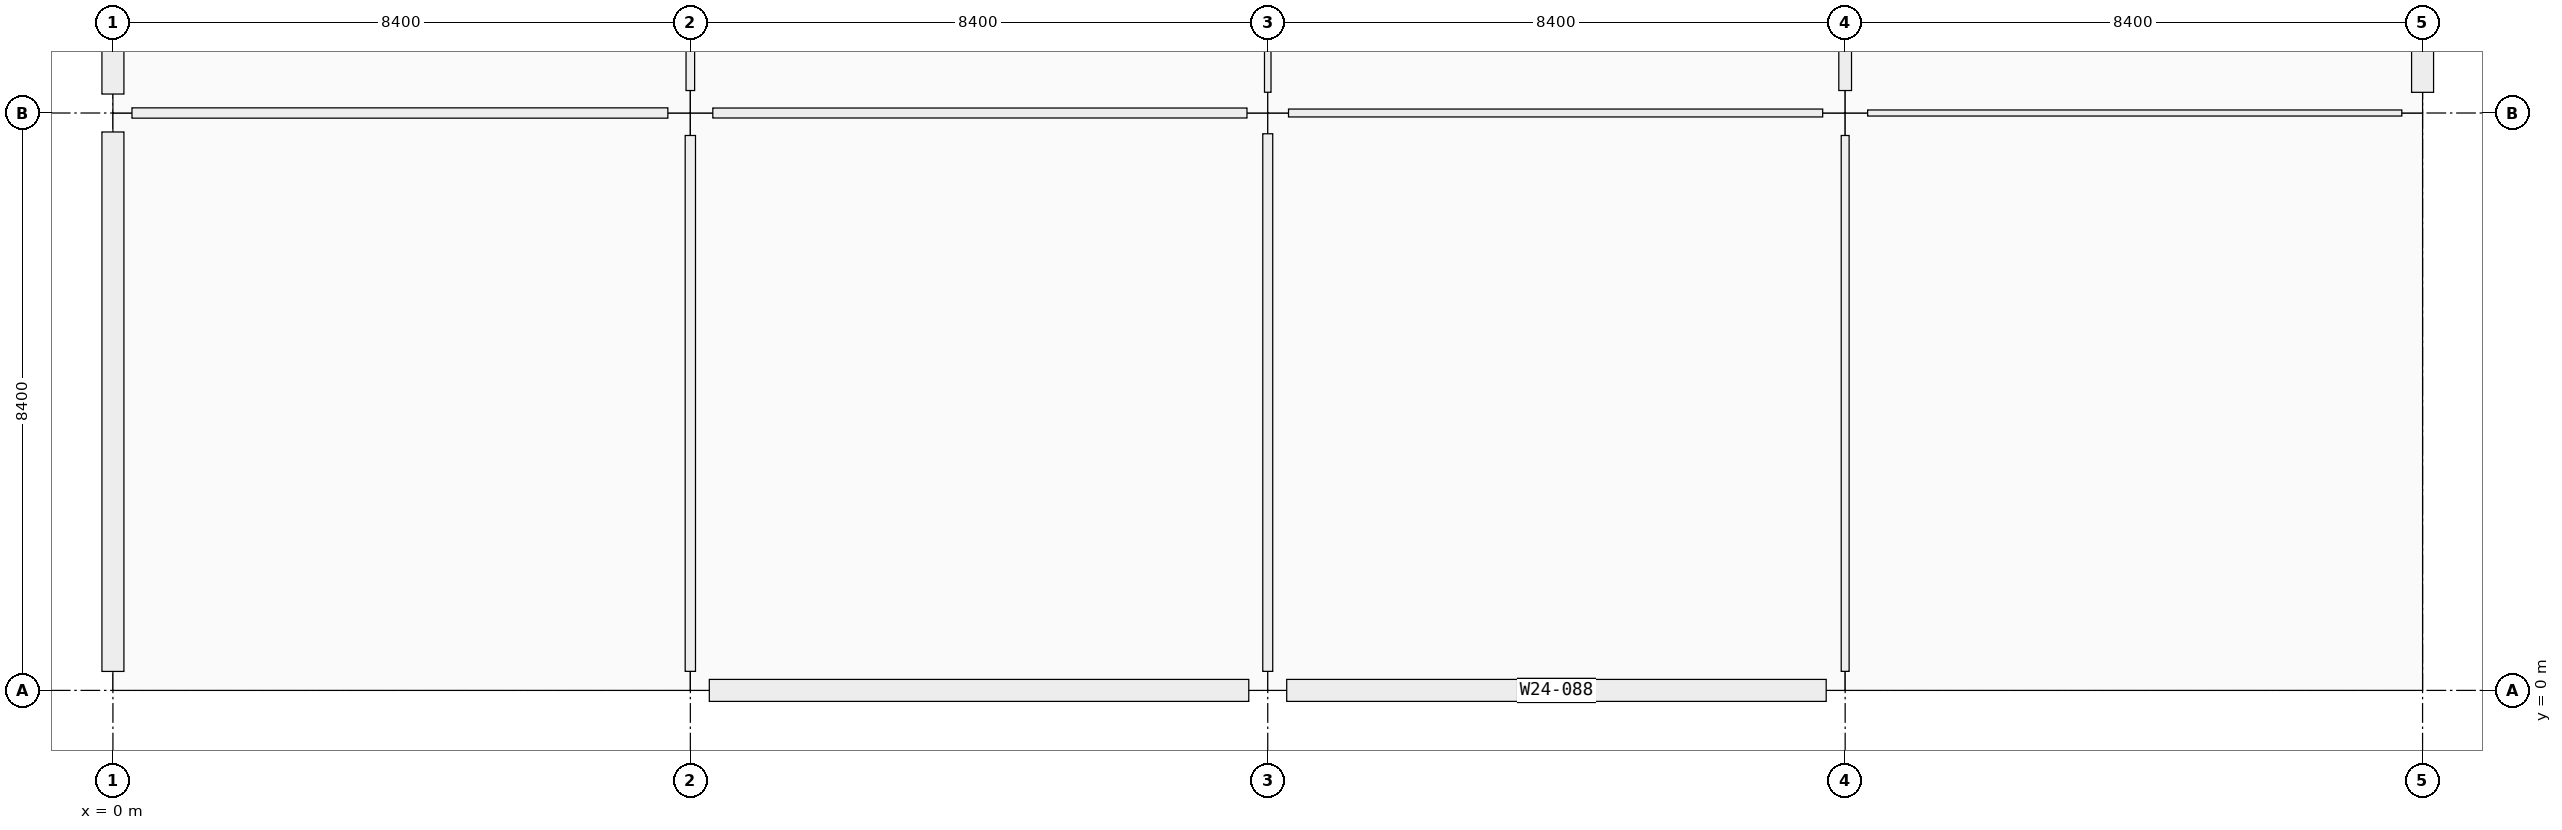
"""IFC4 building model, lengths in metres.
Left out: names, types, materials, properties, quantities, classifications, styles, units other than length and angle.
Written with IfcOpenShell. Run it as: python <this file> out.ifc"""

import sys

from ifc_helpers import new_model, si_unit, direction, frame, frame_2d, origin, origin_2d, place, context, subcontext, project, spatial, rectangle, extrude, element, fill, save


model = new_model("IFC4")
c1 = context("Model", 3, precision=1e-05, world=origin(), true_north=direction((0.0, 1.0)))
c2 = subcontext(c1, "Body", "Model", "MODEL_VIEW")
j1 = project(units=[si_unit("LENGTHUNIT", "METRE"), si_unit("PLANEANGLEUNIT", "RADIAN")], contexts=[c1])
p1 = place(None, origin())
s1 = spatial("IfcSite", under=j1, at=p1, CompositionType="ELEMENT")
p2 = place(p1, origin())
s2 = spatial("IfcBuilding", under=s1, at=p2, CompositionType="ELEMENT")
p3 = place(p2, frame((0.0, 0.0, 5.76)))
s3 = spatial("IfcBuildingStorey", under=s2, at=p3, CompositionType="ELEMENT", Elevation=5.76)
for number, where, z_axis, x_axis in (
    (1, (0.0, 0.0, 0.0), (0.0, 0.0, 1.0), (1.0, 0.0, 0.0)),
    (2, (0.0, 8.4, 0.0), (0.0, 0.0, 1.0), (1.0, 0.0, 0.0)),
    (3, (8.4, 0.0, 0.0), (0.0, 0.0, 1.0), (1.0, 0.0, 0.0)),
):
    element("IfcColumn", number, at=place(p3, frame(where, z_axis=z_axis, x_axis=x_axis)), inside=s3, PredefinedType="COLUMN", context=c2, shape_type="SweptSolid", body=[
        extrude(rectangle(XDim=0.55, YDim=0.55, at=origin_2d()), origin(), (0.0, 0.0, 1.0), 4.2),
    ])
p4 = place(p3, frame((8.4, 8.4, 0.0), z_axis=(0.0, 0.0, 1.0), x_axis=(1.0, 0.0, 0.0)))
e4 = element("IfcColumn", 4, at=p4, inside=s3, PredefinedType="COLUMN", context=c2, shape_type="SweptSolid", body=[
    extrude(rectangle(XDim=0.65, YDim=0.65, at=origin_2d()), origin(), (0.0, 0.0, 1.0), 4.5),
])
p5 = place(p3, frame((16.8, 0.0, 0.0), z_axis=(0.0, 0.0, 1.0), x_axis=(1.0, 0.0, 0.0)))
e5 = element("IfcColumn", 5, at=p5, inside=s3, PredefinedType="COLUMN", context=c2, shape_type="SweptSolid", body=[
    extrude(rectangle(XDim=0.55, YDim=0.55, at=origin_2d()), origin(), (0.0, 0.0, 1.0), 4.2),
])
p6 = place(p3, frame((16.8, 8.4, 0.0), z_axis=(0.0, 0.0, 1.0), x_axis=(1.0, 0.0, 0.0)))
e6 = element("IfcColumn", 6, at=p6, inside=s3, PredefinedType="COLUMN", context=c2, shape_type="SweptSolid", body=[
    extrude(rectangle(XDim=0.6, YDim=0.6, at=origin_2d()), origin(), (0.0, 0.0, 1.0), 4.5),
])
p7 = place(p3, frame((25.2, 0.0, 0.0), z_axis=(0.0, 0.0, 1.0), x_axis=(1.0, 0.0, 0.0)))
e7 = element("IfcColumn", 7, at=p7, inside=s3, PredefinedType="COLUMN", context=c2, shape_type="SweptSolid", body=[
    extrude(rectangle(XDim=0.55, YDim=0.55, at=origin_2d()), origin(), (0.0, 0.0, 1.0), 4.2),
])
p8 = place(p3, frame((25.2, 8.4, 0.0), z_axis=(0.0, 0.0, 1.0), x_axis=(1.0, 0.0, 0.0)))
e8 = element("IfcColumn", 8, at=p8, inside=s3, PredefinedType="COLUMN", context=c2, shape_type="SweptSolid", body=[
    extrude(rectangle(XDim=0.65, YDim=0.65, at=origin_2d()), origin(), (0.0, 0.0, 1.0), 4.5),
])
p9 = place(p3, frame((33.6, 0.0, 0.0), z_axis=(0.0, 0.0, 1.0), x_axis=(1.0, 0.0, 0.0)))
e9 = element("IfcColumn", 9, at=p9, inside=s3, PredefinedType="COLUMN", context=c2, shape_type="SweptSolid", body=[
    extrude(rectangle(XDim=0.55, YDim=0.55, at=origin_2d()), origin(), (0.0, 0.0, 1.0), 4.2),
])
p10 = place(p3, frame((33.6, 8.4, 0.0), z_axis=(0.0, 0.0, 1.0), x_axis=(1.0, 0.0, 0.0)))
e10 = element("IfcColumn", 10, at=p10, inside=s3, PredefinedType="COLUMN", context=c2, shape_type="SweptSolid", body=[
    extrude(rectangle(XDim=0.6, YDim=0.6, at=origin_2d()), origin(), (0.0, 0.0, 1.0), 4.5),
])
p11 = place(p3, frame((0.0, 0.276, 0.0), z_axis=(0.0, 0.0, 1.0), x_axis=(0.0, 1.0, 0.0)))
e11 = element("IfcWall", 11, at=p11, inside=s3, PredefinedType="SOLIDWALL", context=c2, shape_type="SweptSolid", body=[
    extrude(rectangle(XDim=7.848, YDim=0.32, at=frame_2d((3.924, 0.0))), origin(), (0.0, 0.0, 1.0), 3.4),
])
p12 = place(p11, frame((2.524, 0.0, 0.9)))
e12 = element("IfcOpeningElement", 12, at=p12, cuts=e11, PredefinedType="OPENING", context=c2, shape_type="SweptSolid", body=[
    extrude(rectangle(XDim=2.8, YDim=1.75, at=frame_2d((1.4, 0.875))), frame((0.0, 0.16, 0.0), z_axis=(0.0, -1.0, 0.0), x_axis=(1.0, 0.0, 0.0)), (0.0, 0.0, 1.0), 0.32),
])
p13 = place(p3, frame((0.0, 8.676, 0.0), z_axis=(0.0, 0.0, 1.0), x_axis=(0.0, 1.0, 0.0)))
e13 = element("IfcWall", 13, at=p13, inside=s3, PredefinedType="SOLIDWALL", context=c2, shape_type="SweptSolid", body=[
    extrude(rectangle(XDim=7.848, YDim=0.32, at=frame_2d((3.924, 0.0))), origin(), (0.0, 0.0, 1.0), 3.4),
])
p14 = place(p13, frame((2.974, 0.0, 0.9)))
e14 = element("IfcOpeningElement", 14, at=p14, cuts=e13, PredefinedType="OPENING", context=c2, shape_type="SweptSolid", body=[
    extrude(rectangle(XDim=1.9, YDim=1.75, at=frame_2d((0.95, 0.875))), frame((0.0, 0.16, 0.0), z_axis=(0.0, -1.0, 0.0), x_axis=(1.0, 0.0, 0.0)), (0.0, 0.0, 1.0), 0.32),
])
p15 = place(p3, frame((16.524, 0.0, 0.0), z_axis=(0.0, 0.0, 1.0), x_axis=(-1.0, 0.0, 0.0)))
e15 = element("IfcWall", 15, at=p15, inside=s3, PredefinedType="SOLIDWALL", context=c2, shape_type="SweptSolid", body=[
    extrude(rectangle(XDim=7.848, YDim=0.32, at=frame_2d((3.924, 0.0))), origin(), (0.0, 0.0, 1.0), 3.4),
])
p16 = place(p15, frame((3.249, 0.0, 0.9)))
e16 = element("IfcOpeningElement", 16, at=p16, cuts=e15, PredefinedType="OPENING", context=c2, shape_type="SweptSolid", body=[
    extrude(rectangle(XDim=1.35, YDim=1.5, at=frame_2d((0.675, 0.75))), frame((0.0, 0.16, 0.0), z_axis=(0.0, -1.0, 0.0), x_axis=(1.0, 0.0, 0.0)), (0.0, 0.0, 1.0), 0.32),
])
p17 = place(p3, frame((24.924, 0.0, 0.0), z_axis=(0.0, 0.0, 1.0), x_axis=(-1.0, 0.0, 0.0)))
e17 = element("IfcWall", 17, at=p17, inside=s3, PredefinedType="SOLIDWALL", context=c2, shape_type="SweptSolid", body=[
    extrude(rectangle(XDim=7.848, YDim=0.32, at=frame_2d((3.924, 0.0))), origin(), (0.0, 0.0, 1.0), 3.4),
])
p18 = place(p17, frame((3.374, 0.0, 0.9)))
e18 = element("IfcOpeningElement", 18, at=p18, cuts=e17, PredefinedType="OPENING", context=c2, shape_type="SweptSolid", body=[
    extrude(rectangle(XDim=1.1, YDim=1.5, at=frame_2d((0.55, 0.75))), frame((0.0, 0.16, 0.0), z_axis=(0.0, -1.0, 0.0), x_axis=(1.0, 0.0, 0.0)), (0.0, 0.0, 1.0), 0.32),
])
p19 = place(p3, frame((33.6, 16.399, 0.0), z_axis=(0.0, 0.0, 1.0), x_axis=(0.0, -1.0, 0.0)))
e19 = element("IfcWall", 19, at=p19, inside=s3, PredefinedType="SOLIDWALL", context=c2, shape_type="SweptSolid", body=[
    extrude(rectangle(XDim=7.698, YDim=0.32, at=frame_2d((3.849, 0.0))), origin(), (0.0, 0.0, 1.0), 3.4),
])
p20 = place(p19, frame((2.699, 0.0, 0.9)))
e20 = element("IfcOpeningElement", 20, at=p20, cuts=e19, PredefinedType="OPENING", context=c2, shape_type="SweptSolid", body=[
    extrude(rectangle(XDim=2.3, YDim=1.85, at=frame_2d((1.15, 0.925))), frame((0.0, 0.16, 0.0), z_axis=(0.0, -1.0, 0.0), x_axis=(1.0, 0.0, 0.0)), (0.0, 0.0, 1.0), 0.32),
])
p21 = place(p3, frame((0.277, 8.4, 0.0), z_axis=(0.0, 0.0, 1.0), x_axis=(1.0, 0.0, 0.0)))
e21 = element("IfcWall", 21, at=p21, inside=s3, PredefinedType="MOVABLE", context=c2, shape_type="SweptSolid", body=[
    extrude(rectangle(XDim=7.796, YDim=0.15, at=frame_2d((3.898, 0.0))), origin(), (0.0, 0.0, 1.0), 2.4),
])
p22 = place(p21, frame((3.358, 0.0, 0.0)))
e22 = element("IfcOpeningElement", 22, at=p22, cuts=e21, PredefinedType="OPENING", context=c2, shape_type="SweptSolid", body=[
    extrude(rectangle(XDim=1.08, YDim=2.22, at=frame_2d((0.54, 1.11))), frame((0.0, 0.075, 0.0), z_axis=(0.0, -1.0, 0.0), x_axis=(1.0, 0.0, 0.0)), (0.0, 0.0, 1.0), 0.15),
])
p23 = place(p3, frame((8.727, 8.4, 0.0), z_axis=(0.0, 0.0, 1.0), x_axis=(1.0, 0.0, 0.0)))
e23 = element("IfcWall", 23, at=p23, inside=s3, PredefinedType="PARTITIONING", context=c2, shape_type="SweptSolid", body=[
    extrude(rectangle(XDim=7.771, YDim=0.145, at=frame_2d((3.885, 0.0))), origin(), (0.0, 0.0, 1.0), 2.4),
])
p24 = place(p23, frame((3.415, 0.0, 0.0)))
e24 = element("IfcOpeningElement", 24, at=p24, cuts=e23, PredefinedType="OPENING", context=c2, shape_type="SweptSolid", body=[
    extrude(rectangle(XDim=0.94, YDim=2.15, at=frame_2d((0.47, 1.075))), frame((0.0, 0.073, 0.0), z_axis=(0.0, -1.0, 0.0), x_axis=(1.0, 0.0, 0.0)), (0.0, 0.0, 1.0), 0.145),
])
p25 = place(p3, frame((17.102, 8.4, 0.0), z_axis=(0.0, 0.0, 1.0), x_axis=(1.0, 0.0, 0.0)))
e25 = element("IfcWall", 25, at=p25, inside=s3, PredefinedType="PARTITIONING", context=c2, shape_type="SweptSolid", body=[
    extrude(rectangle(XDim=7.771, YDim=0.115, at=frame_2d((3.885, 0.0))), origin(), (0.0, 0.0, 1.0), 2.4),
])
p26 = place(p25, frame((3.361, 0.0, 0.0)))
e26 = element("IfcOpeningElement", 26, at=p26, cuts=e25, PredefinedType="OPENING", context=c2, shape_type="SweptSolid", body=[
    extrude(rectangle(XDim=1.05, YDim=2.12, at=frame_2d((0.525, 1.06))), frame((0.0, 0.058, 0.0), z_axis=(0.0, -1.0, 0.0), x_axis=(1.0, 0.0, 0.0)), (0.0, 0.0, 1.0), 0.115),
])
p27 = place(p3, frame((25.527, 8.4, 0.0), z_axis=(0.0, 0.0, 1.0), x_axis=(1.0, 0.0, 0.0)))
e27 = element("IfcWall", 27, at=p27, inside=s3, PredefinedType="PARTITIONING", context=c2, shape_type="SweptSolid", body=[
    extrude(rectangle(XDim=7.771, YDim=0.088, at=frame_2d((3.885, 0.0))), origin(), (0.0, 0.0, 1.0), 2.4),
])
p28 = place(p27, frame((3.381, 0.0, 0.0)))
e28 = element("IfcOpeningElement", 28, at=p28, cuts=e27, PredefinedType="OPENING", context=c2, shape_type="SweptSolid", body=[
    extrude(rectangle(XDim=1.01, YDim=2.12, at=frame_2d((0.505, 1.06))), frame((0.0, 0.044, 0.0), z_axis=(0.0, -1.0, 0.0), x_axis=(1.0, 0.0, 0.0)), (0.0, 0.0, 1.0), 0.088),
])
p29 = place(p3, frame((8.4, 0.277, 0.0), z_axis=(0.0, 0.0, 1.0), x_axis=(0.0, 1.0, 0.0)))
e29 = element("IfcWall", 29, at=p29, inside=s3, PredefinedType="MOVABLE", context=c2, shape_type="SweptSolid", body=[
    extrude(rectangle(XDim=7.796, YDim=0.15, at=frame_2d((3.898, 0.0))), origin(), (0.0, 0.0, 1.0), 2.4),
])
p30 = place(p29, frame((3.388, 0.0, 0.0)))
e30 = element("IfcOpeningElement", 30, at=p30, cuts=e29, PredefinedType="OPENING", context=c2, shape_type="SweptSolid", body=[
    extrude(rectangle(XDim=1.02, YDim=2.2, at=frame_2d((0.51, 1.1))), frame((0.0, 0.075, 0.0), z_axis=(0.0, -1.0, 0.0), x_axis=(1.0, 0.0, 0.0)), (0.0, 0.0, 1.0), 0.15),
])
p31 = place(p3, frame((8.4, 8.727, 0.0), z_axis=(0.0, 0.0, 1.0), x_axis=(0.0, 1.0, 0.0)))
e31 = element("IfcWall", 31, at=p31, inside=s3, PredefinedType="PARTITIONING", context=c2, shape_type="SweptSolid", body=[
    extrude(rectangle(XDim=7.671, YDim=0.125, at=frame_2d((3.835, 0.0))), origin(), (0.0, 0.0, 1.0), 2.4),
])
p32 = place(p31, frame((3.336, 0.0, 0.0)))
e32 = element("IfcOpeningElement", 32, at=p32, cuts=e31, PredefinedType="OPENING", context=c2, shape_type="SweptSolid", body=[
    extrude(rectangle(XDim=1.0, YDim=2.2, at=frame_2d((0.5, 1.1))), frame((0.0, 0.062, 0.0), z_axis=(0.0, -1.0, 0.0), x_axis=(1.0, 0.0, 0.0)), (0.0, 0.0, 1.0), 0.125),
])
p33 = place(p3, frame((16.8, 0.277, 0.0), z_axis=(0.0, 0.0, 1.0), x_axis=(0.0, 1.0, 0.0)))
e33 = element("IfcWall", 33, at=p33, inside=s3, PredefinedType="PARTITIONING", context=c2, shape_type="SweptSolid", body=[
    extrude(rectangle(XDim=7.821, YDim=0.145, at=frame_2d((3.91, 0.0))), origin(), (0.0, 0.0, 1.0), 2.4),
])
p34 = place(p33, frame((3.45, 0.0, 0.0)))
e34 = element("IfcOpeningElement", 34, at=p34, cuts=e33, PredefinedType="OPENING", context=c2, shape_type="SweptSolid", body=[
    extrude(rectangle(XDim=0.92, YDim=2.15, at=frame_2d((0.46, 1.075))), frame((0.0, 0.073, 0.0), z_axis=(0.0, -1.0, 0.0), x_axis=(1.0, 0.0, 0.0)), (0.0, 0.0, 1.0), 0.145),
])
p35 = place(p3, frame((16.8, 8.702, 0.0), z_axis=(0.0, 0.0, 1.0), x_axis=(0.0, 1.0, 0.0)))
e35 = element("IfcWall", 35, at=p35, inside=s3, PredefinedType="PARTITIONING", context=c2, shape_type="SweptSolid", body=[
    extrude(rectangle(XDim=7.696, YDim=0.095, at=frame_2d((3.848, 0.0))), origin(), (0.0, 0.0, 1.0), 2.4),
])
p36 = place(p35, frame((3.323, 0.0, 0.0)))
e36 = element("IfcOpeningElement", 36, at=p36, cuts=e35, PredefinedType="OPENING", context=c2, shape_type="SweptSolid", body=[
    extrude(rectangle(XDim=1.05, YDim=2.12, at=frame_2d((0.525, 1.06))), frame((0.0, 0.047, 0.0), z_axis=(0.0, -1.0, 0.0), x_axis=(1.0, 0.0, 0.0)), (0.0, 0.0, 1.0), 0.095),
])
p37 = place(p3, frame((25.2, 0.277, 0.0), z_axis=(0.0, 0.0, 1.0), x_axis=(0.0, 1.0, 0.0)))
e37 = element("IfcWall", 37, at=p37, inside=s3, PredefinedType="PARTITIONING", context=c2, shape_type="SweptSolid", body=[
    extrude(rectangle(XDim=7.796, YDim=0.115, at=frame_2d((3.898, 0.0))), origin(), (0.0, 0.0, 1.0), 2.4),
])
p38 = place(p37, frame((3.358, 0.0, 0.0)))
e38 = element("IfcOpeningElement", 38, at=p38, cuts=e37, PredefinedType="OPENING", context=c2, shape_type="SweptSolid", body=[
    extrude(rectangle(XDim=1.08, YDim=2.22, at=frame_2d((0.54, 1.11))), frame((0.0, 0.058, 0.0), z_axis=(0.0, -1.0, 0.0), x_axis=(1.0, 0.0, 0.0)), (0.0, 0.0, 1.0), 0.115),
])
p39 = place(p3, frame((25.2, 8.727, 0.0), z_axis=(0.0, 0.0, 1.0), x_axis=(0.0, 1.0, 0.0)))
e39 = element("IfcWall", 39, at=p39, inside=s3, PredefinedType="PARTITIONING", context=c2, shape_type="SweptSolid", body=[
    extrude(rectangle(XDim=7.671, YDim=0.185, at=frame_2d((3.835, 0.0))), origin(), (0.0, 0.0, 1.0), 2.4),
])
p40 = place(p39, frame((3.306, 0.0, 0.0)))
e40 = element("IfcOpeningElement", 40, at=p40, cuts=e39, PredefinedType="OPENING", context=c2, shape_type="SweptSolid", body=[
    extrude(rectangle(XDim=1.06, YDim=2.22, at=frame_2d((0.53, 1.11))), frame((0.0, 0.093, 0.0), z_axis=(0.0, -1.0, 0.0), x_axis=(1.0, 0.0, 0.0)), (0.0, 0.0, 1.0), 0.185),
])
p41 = place(p12, origin())
e41 = element("IfcWindow", 41, at=p41, inside=s3, PartitioningType="SINGLE_PANEL", PredefinedType="WINDOW", context=c2, shape_type="SweptSolid", body=[
    extrude(rectangle(XDim=2.8, YDim=1.75, at=frame_2d((1.4, 0.875))), frame((0.0, 0.03, 0.0), z_axis=(0.0, -1.0, 0.0), x_axis=(1.0, 0.0, 0.0)), (0.0, 0.0, 1.0), 0.06),
])
fill(e12, e41)
p42 = place(p16, origin())
e42 = element("IfcWindow", 42, at=p42, inside=s3, PartitioningType="SINGLE_PANEL", PredefinedType="WINDOW", context=c2, shape_type="SweptSolid", body=[
    extrude(rectangle(XDim=1.35, YDim=1.5, at=frame_2d((0.675, 0.75))), frame((0.0, 0.03, 0.0), z_axis=(0.0, -1.0, 0.0), x_axis=(1.0, 0.0, 0.0)), (0.0, 0.0, 1.0), 0.06),
])
fill(e16, e42)
p43 = place(p18, origin())
e43 = element("IfcWindow", 43, at=p43, inside=s3, PartitioningType="SINGLE_PANEL", PredefinedType="WINDOW", context=c2, shape_type="SweptSolid", body=[
    extrude(rectangle(XDim=1.1, YDim=1.5, at=frame_2d((0.55, 0.75))), frame((0.0, 0.03, 0.0), z_axis=(0.0, -1.0, 0.0), x_axis=(1.0, 0.0, 0.0)), (0.0, 0.0, 1.0), 0.06),
])
fill(e18, e43)
p44 = place(p22, origin())
e44 = element("IfcDoor", 44, at=p44, inside=s3, OperationType="SINGLE_SWING_LEFT", PredefinedType="DOOR", context=c2, shape_type="SweptSolid", body=[
    extrude(rectangle(XDim=1.08, YDim=2.22, at=frame_2d((0.54, 1.11))), frame((0.0, 0.025, 0.0), z_axis=(0.0, -1.0, 0.0), x_axis=(1.0, 0.0, 0.0)), (0.0, 0.0, 1.0), 0.05),
])
fill(e22, e44)
p45 = place(p24, origin())
e45 = element("IfcDoor", 45, at=p45, inside=s3, OperationType="SINGLE_SWING_RIGHT", PredefinedType="DOOR", context=c2, shape_type="SweptSolid", body=[
    extrude(rectangle(XDim=0.94, YDim=2.15, at=frame_2d((0.47, 1.075))), frame((0.0, 0.025, 0.0), z_axis=(0.0, -1.0, 0.0), x_axis=(1.0, 0.0, 0.0)), (0.0, 0.0, 1.0), 0.05),
])
fill(e24, e45)
p46 = place(p26, origin())
e46 = element("IfcDoor", 46, at=p46, inside=s3, OperationType="SINGLE_SWING_RIGHT", PredefinedType="DOOR", context=c2, shape_type="SweptSolid", body=[
    extrude(rectangle(XDim=1.05, YDim=2.12, at=frame_2d((0.525, 1.06))), frame((0.0, 0.025, 0.0), z_axis=(0.0, -1.0, 0.0), x_axis=(1.0, 0.0, 0.0)), (0.0, 0.0, 1.0), 0.05),
])
fill(e26, e46)
p47 = place(p28, origin())
e47 = element("IfcDoor", 47, at=p47, inside=s3, OperationType="SINGLE_SWING_LEFT", PredefinedType="DOOR", context=c2, shape_type="SweptSolid", body=[
    extrude(rectangle(XDim=1.01, YDim=2.12, at=frame_2d((0.505, 1.06))), frame((0.0, 0.025, 0.0), z_axis=(0.0, -1.0, 0.0), x_axis=(1.0, 0.0, 0.0)), (0.0, 0.0, 1.0), 0.05),
])
fill(e28, e47)
p48 = place(p30, origin())
e48 = element("IfcDoor", 48, at=p48, inside=s3, OperationType="SINGLE_SWING_RIGHT", PredefinedType="DOOR", context=c2, shape_type="SweptSolid", body=[
    extrude(rectangle(XDim=1.02, YDim=2.2, at=frame_2d((0.51, 1.1))), frame((0.0, 0.025, 0.0), z_axis=(0.0, -1.0, 0.0), x_axis=(1.0, 0.0, 0.0)), (0.0, 0.0, 1.0), 0.05),
])
fill(e30, e48)
p49 = place(p34, origin())
e49 = element("IfcDoor", 49, at=p49, inside=s3, OperationType="SINGLE_SWING_LEFT", PredefinedType="DOOR", context=c2, shape_type="SweptSolid", body=[
    extrude(rectangle(XDim=0.92, YDim=2.15, at=frame_2d((0.46, 1.075))), frame((0.0, 0.025, 0.0), z_axis=(0.0, -1.0, 0.0), x_axis=(1.0, 0.0, 0.0)), (0.0, 0.0, 1.0), 0.05),
])
fill(e34, e49)
p50 = place(p38, origin())
e50 = element("IfcDoor", 50, at=p50, inside=s3, OperationType="SINGLE_SWING_RIGHT", PredefinedType="DOOR", context=c2, shape_type="SweptSolid", body=[
    extrude(rectangle(XDim=1.08, YDim=2.22, at=frame_2d((0.54, 1.11))), frame((0.0, 0.025, 0.0), z_axis=(0.0, -1.0, 0.0), x_axis=(1.0, 0.0, 0.0)), (0.0, 0.0, 1.0), 0.05),
])
fill(e38, e50)
save(model, sys.argv[1])
